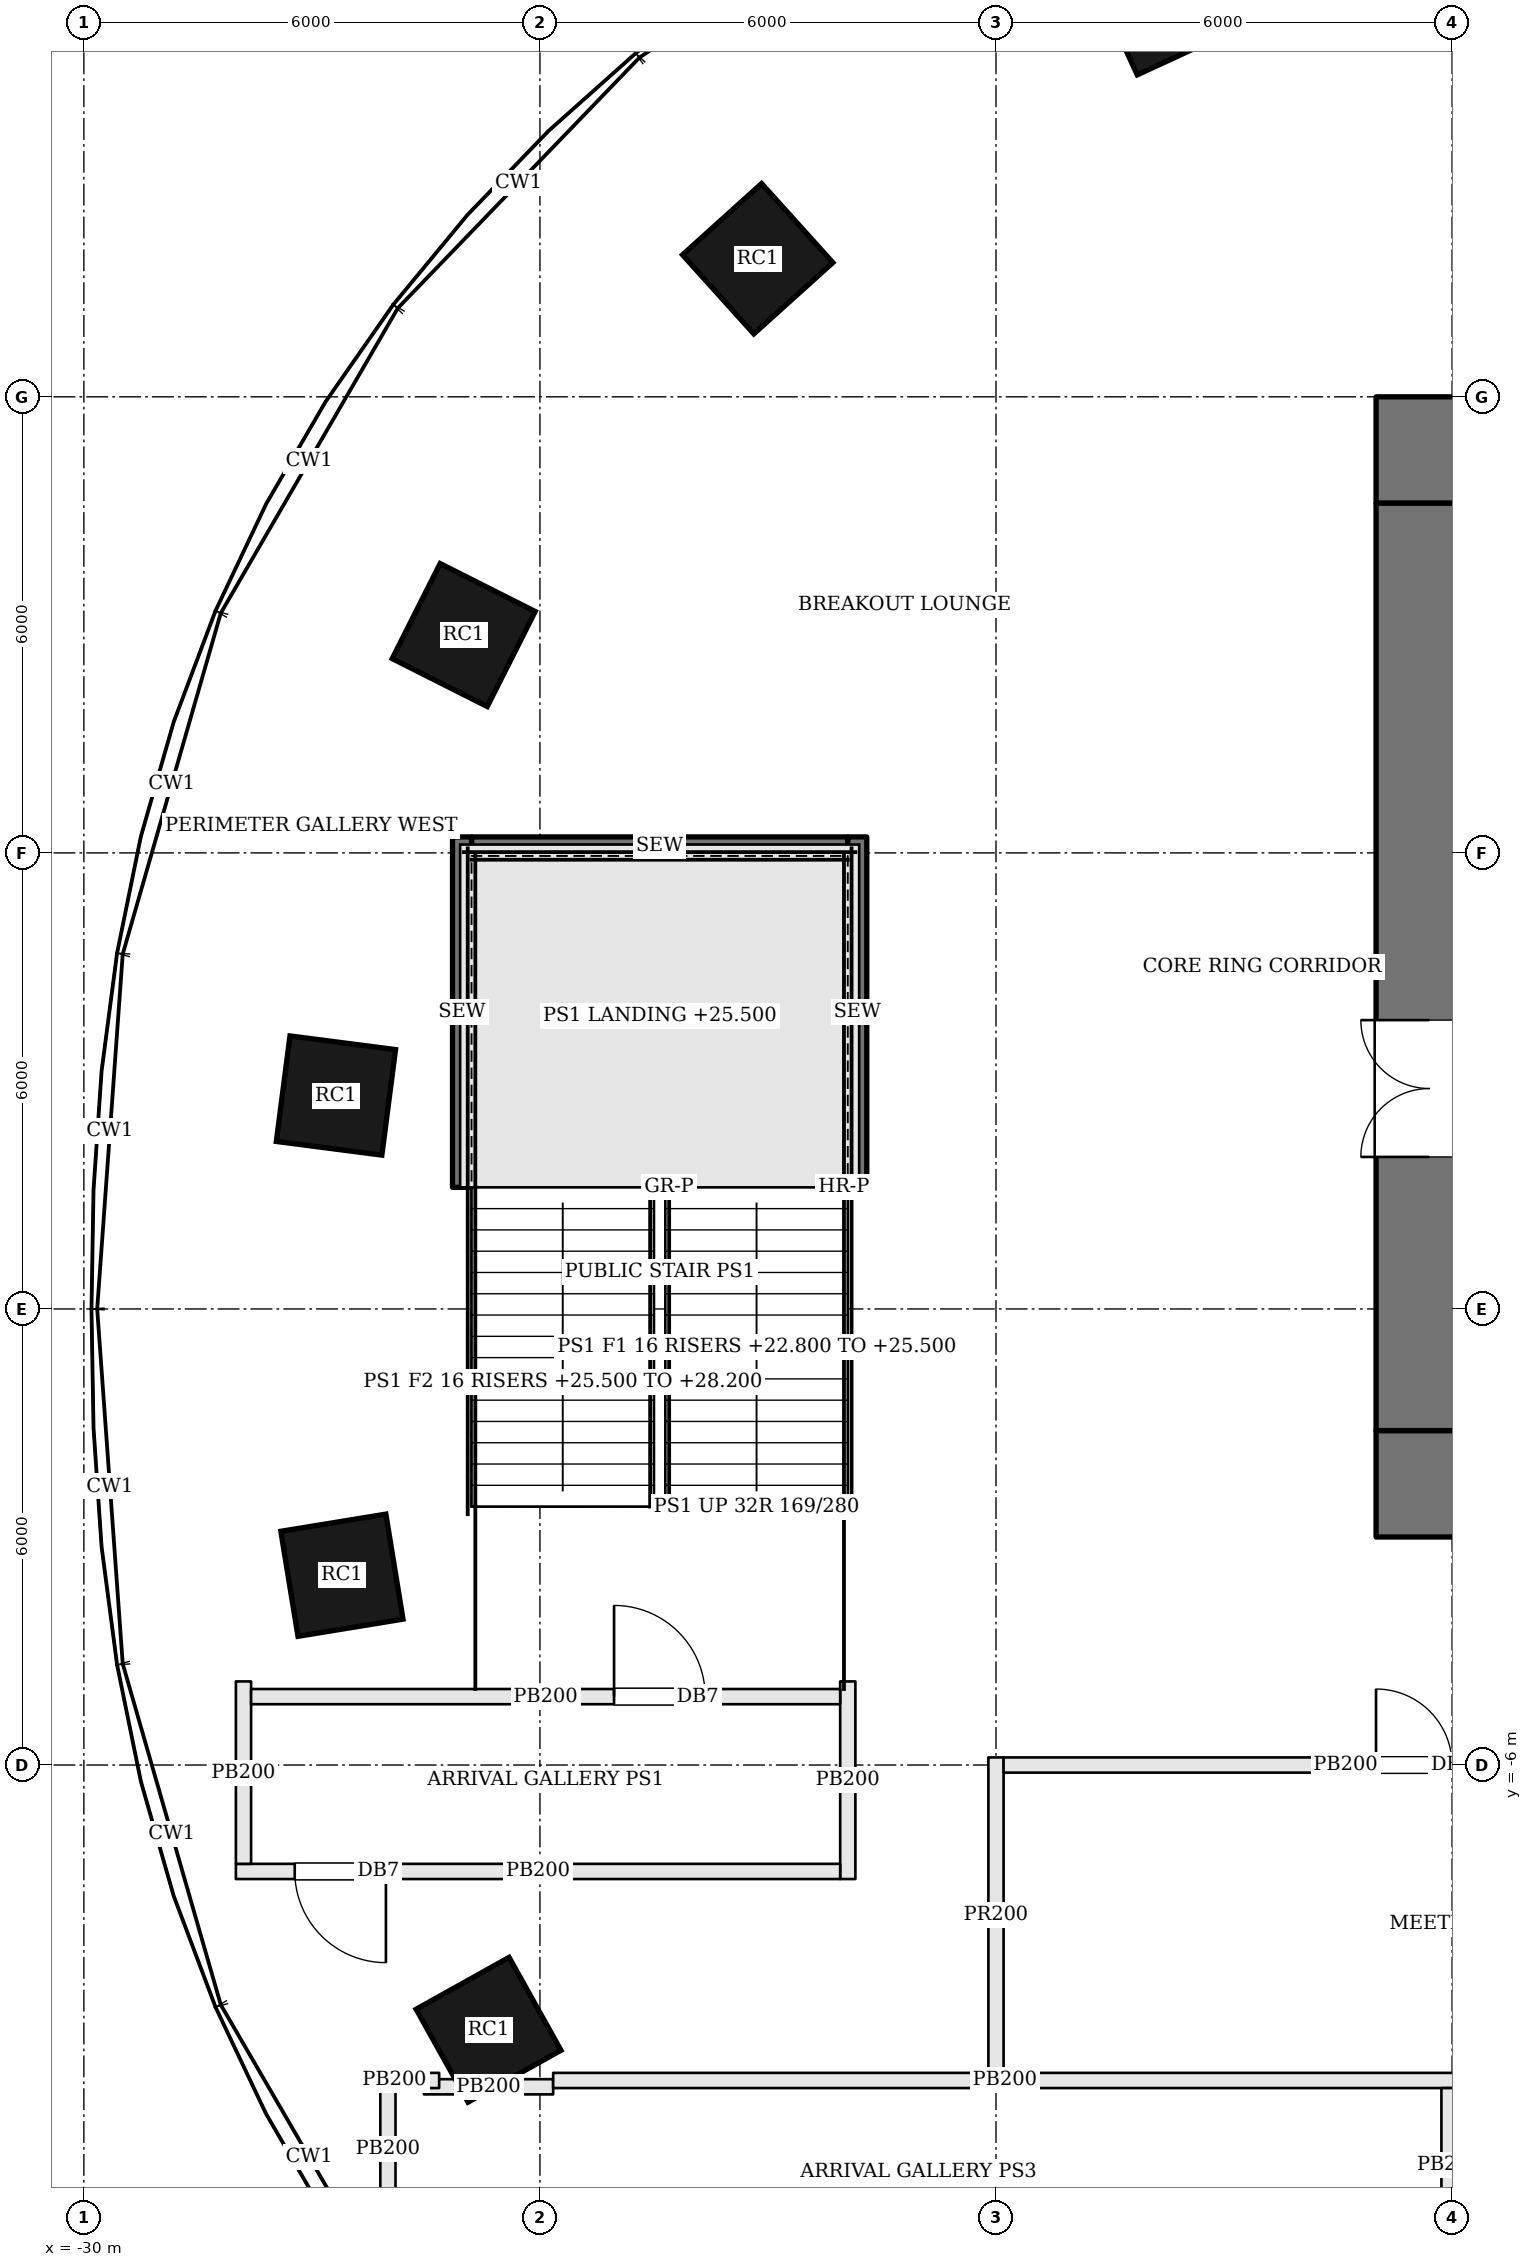
"""IFC4 building model, lengths in metres.
Left out: names, types, materials, properties, quantities, classifications, styles, units other than length and angle.
Written with IfcOpenShell. Run it as: python <this file> out.ifc"""

import sys

from ifc_helpers import new_model, si_unit, direction, frame, frame_2d, origin, origin_2d, place, context, subcontext, project, spatial, rectangle, extrude, element, fill, save


model = new_model("IFC4")
c1 = context("Model", 3, precision=1e-05, world=origin(), true_north=direction((0.0, 1.0)))
c2 = subcontext(c1, "Body", "Model", "MODEL_VIEW")
j1 = project(units=[si_unit("LENGTHUNIT", "METRE"), si_unit("PLANEANGLEUNIT", "RADIAN")], contexts=[c1])
p1 = place(None, origin())
s1 = spatial("IfcSite", under=j1, at=p1, CompositionType="ELEMENT")
p2 = place(p1, origin())
s2 = spatial("IfcBuilding", under=s1, at=p2, CompositionType="ELEMENT")
p3 = place(p2, frame((0.0, 0.0, 22.8)))
s3 = spatial("IfcBuildingStorey", under=s2, at=p3, CompositionType="ELEMENT", Elevation=22.8)
p4 = place(p3, frame((-13.0, 11.3, 0.0), z_axis=(0.0, 0.0, 1.0), x_axis=(1.0, 0.0, 0.0)))
e1 = element("IfcWall", 1, at=p4, inside=s3, PredefinedType="SHEAR", context=c2, shape_type="SweptSolid", body=[
    extrude(rectangle(XDim=26.0, YDim=1.4, at=frame_2d((13.0, 0.0))), origin(), (0.0, 0.0, 1.0), 5.4),
])
p5 = place(p4, frame((8.575, 0.0, 0.0)))
e2 = element("IfcOpeningElement", 2, at=p5, cuts=e1, PredefinedType="OPENING", context=c2, shape_type="SweptSolid", body=[
    extrude(rectangle(XDim=0.7, YDim=2.1, at=frame_2d((0.35, 1.05))), frame((0.0, 0.71, 0.0), z_axis=(0.0, -1.0, 0.0), x_axis=(1.0, 0.0, 0.0)), (0.0, 0.0, 1.0), 1.42),
])
p6 = place(p4, frame((10.875, 0.0, 0.0)))
e3 = element("IfcOpeningElement", 3, at=p6, cuts=e1, PredefinedType="OPENING", context=c2, shape_type="SweptSolid", body=[
    extrude(rectangle(XDim=1.0, YDim=2.1, at=frame_2d((0.5, 1.05))), frame((0.0, 0.71, 0.0), z_axis=(0.0, -1.0, 0.0), x_axis=(1.0, 0.0, 0.0)), (0.0, 0.0, 1.0), 1.42),
])
p7 = place(p4, frame((13.875, 0.0, 0.0)))
e4 = element("IfcOpeningElement", 4, at=p7, cuts=e1, PredefinedType="OPENING", context=c2, shape_type="SweptSolid", body=[
    extrude(rectangle(XDim=0.7, YDim=2.1, at=frame_2d((0.35, 1.05))), frame((0.0, 0.71, 0.0), z_axis=(0.0, -1.0, 0.0), x_axis=(1.0, 0.0, 0.0)), (0.0, 0.0, 1.0), 1.42),
])
p8 = place(p4, frame((16.175, 0.0, 0.0)))
e5 = element("IfcOpeningElement", 5, at=p8, cuts=e1, PredefinedType="OPENING", context=c2, shape_type="SweptSolid", body=[
    extrude(rectangle(XDim=1.0, YDim=2.1, at=frame_2d((0.5, 1.05))), frame((0.0, 0.71, 0.0), z_axis=(0.0, -1.0, 0.0), x_axis=(1.0, 0.0, 0.0)), (0.0, 0.0, 1.0), 1.42),
])
p9 = place(p3, frame((-13.0, -2.3, 0.0), z_axis=(0.0, 0.0, 1.0), x_axis=(1.0, 0.0, 0.0)))
e6 = element("IfcWall", 6, at=p9, inside=s3, PredefinedType="SHEAR", context=c2, shape_type="SweptSolid", body=[
    extrude(rectangle(XDim=26.0, YDim=1.4, at=frame_2d((13.0, 0.0))), origin(), (0.0, 0.0, 1.0), 5.4),
])
p10 = place(p9, frame((9.3, 0.0, 0.0)))
e7 = element("IfcOpeningElement", 7, at=p10, cuts=e6, PredefinedType="OPENING", context=c2, shape_type="SweptSolid", body=[
    extrude(rectangle(XDim=0.9, YDim=2.1, at=frame_2d((0.45, 1.05))), frame((0.0, 0.71, 0.0), z_axis=(0.0, -1.0, 0.0), x_axis=(1.0, 0.0, 0.0)), (0.0, 0.0, 1.0), 1.42),
])
p11 = place(p9, frame((12.5, 0.0, 0.0)))
e8 = element("IfcOpeningElement", 8, at=p11, cuts=e6, PredefinedType="OPENING", context=c2, shape_type="SweptSolid", body=[
    extrude(rectangle(XDim=0.9, YDim=2.1, at=frame_2d((0.45, 1.05))), frame((0.0, 0.71, 0.0), z_axis=(0.0, -1.0, 0.0), x_axis=(1.0, 0.0, 0.0)), (0.0, 0.0, 1.0), 1.42),
])
p12 = place(p9, frame((14.9, 0.0, 0.0)))
e9 = element("IfcOpeningElement", 9, at=p12, cuts=e6, PredefinedType="OPENING", context=c2, shape_type="SweptSolid", body=[
    extrude(rectangle(XDim=1.0, YDim=2.1, at=frame_2d((0.5, 1.05))), frame((0.0, 0.71, 0.0), z_axis=(0.0, -1.0, 0.0), x_axis=(1.0, 0.0, 0.0)), (0.0, 0.0, 1.0), 1.42),
])
p13 = place(p9, frame((16.6, 0.0, 0.0)))
e10 = element("IfcOpeningElement", 10, at=p13, cuts=e6, PredefinedType="OPENING", context=c2, shape_type="SweptSolid", body=[
    extrude(rectangle(XDim=1.0, YDim=2.1, at=frame_2d((0.5, 1.05))), frame((0.0, 0.71, 0.0), z_axis=(0.0, -1.0, 0.0), x_axis=(1.0, 0.0, 0.0)), (0.0, 0.0, 1.0), 1.42),
])
p14 = place(p3, frame((-12.3, -1.6, 0.0), z_axis=(0.0, 0.0, 1.0), x_axis=(0.0, 1.0, 0.0)))
e11 = element("IfcWall", 11, at=p14, inside=s3, PredefinedType="SHEAR", context=c2, shape_type="SweptSolid", body=[
    extrude(rectangle(XDim=12.2, YDim=1.4, at=frame_2d((6.1, 0.0))), origin(), (0.0, 0.0, 1.0), 5.4),
])
p15 = place(p14, frame((3.6, 0.0, 0.0)))
e12 = element("IfcOpeningElement", 12, at=p15, cuts=e11, PredefinedType="OPENING", context=c2, shape_type="SweptSolid", body=[
    extrude(rectangle(XDim=1.8, YDim=2.1, at=frame_2d((0.9, 1.05))), frame((0.0, 0.71, 0.0), z_axis=(0.0, -1.0, 0.0), x_axis=(1.0, 0.0, 0.0)), (0.0, 0.0, 1.0), 1.42),
])
for number, where, z_axis, x_axis in (
    (13, (-15.799, 17.165, 0.0), (0.0, 0.0, 1.0), (-0.908, -0.419, 0.0)),
    (14, (-21.135, 13.817, 0.0), (0.0, 0.0, 1.0), (-0.743, -0.67, 0.0)),
    (15, (-25.003, 8.866, 0.0), (0.0, 0.0, 1.0), (-0.45, -0.893, 0.0)),
    (16, (-26.684, 2.808, 0.0), (0.0, 0.0, 1.0), (-0.128, -0.992, 0.0)),
    (17, (-26.605, -3.503, 0.0), (0.0, 0.0, 1.0), (0.161, -0.987, 0.0)),
    (18, (-24.676, -9.483, 0.0), (0.0, 0.0, 1.0), (0.487, -0.873, 0.0)),
):
    element("IfcColumn", number, at=place(p3, frame(where, z_axis=z_axis, x_axis=x_axis)), inside=s3, PredefinedType="COLUMN", context=c2, shape_type="SweptSolid", body=[
        extrude(rectangle(XDim=1.4, YDim=1.4, at=origin_2d()), origin(), (0.0, 0.0, 1.0), 5.4),
    ])
p16 = place(p3, frame((-19.95, -4.9, 0.0), z_axis=(0.0, 0.0, 1.0), x_axis=(0.0, -1.0, 0.0)))
e19 = element("IfcWall", 19, at=p16, inside=s3, PredefinedType="PARTITIONING", context=c2, shape_type="SweptSolid", body=[
    extrude(rectangle(XDim=2.6, YDim=0.2, at=frame_2d((1.3, 0.0))), origin(), (0.0, 0.0, 1.0), 4.43),
])
p17 = place(p3, frame((-20.05, -7.4, 0.0), z_axis=(0.0, 0.0, 1.0), x_axis=(-1.0, 0.0, 0.0)))
e20 = element("IfcWall", 20, at=p17, inside=s3, PredefinedType="PARTITIONING", context=c2, shape_type="SweptSolid", body=[
    extrude(rectangle(XDim=7.95, YDim=0.2, at=frame_2d((3.975, 0.0))), origin(), (0.0, 0.0, 1.0), 4.43),
])
p18 = place(p17, frame((5.976, 0.0, 0.0)))
e21 = element("IfcOpeningElement", 21, at=p18, cuts=e20, PredefinedType="OPENING", context=c2, shape_type="SweptSolid", body=[
    extrude(rectangle(XDim=1.2, YDim=2.1, at=frame_2d((0.6, 1.05))), frame((0.0, 0.11, 0.0), z_axis=(0.0, -1.0, 0.0), x_axis=(1.0, 0.0, 0.0)), (0.0, 0.0, 1.0), 0.22),
])
p19 = place(p3, frame((-27.9, -7.3, 0.0), z_axis=(0.0, 0.0, 1.0), x_axis=(0.0, 1.0, 0.0)))
e22 = element("IfcWall", 22, at=p19, inside=s3, PredefinedType="PARTITIONING", context=c2, shape_type="SweptSolid", body=[
    extrude(rectangle(XDim=2.4, YDim=0.2, at=frame_2d((1.2, 0.0))), origin(), (0.0, 0.0, 1.0), 4.43),
])
p20 = place(p3, frame((-27.8, -5.1, 0.0), z_axis=(0.0, 0.0, 1.0), x_axis=(1.0, 0.0, 0.0)))
e23 = element("IfcWall", 23, at=p20, inside=s3, PredefinedType="PARTITIONING", context=c2, shape_type="SweptSolid", body=[
    extrude(rectangle(XDim=7.75, YDim=0.2, at=frame_2d((3.875, 0.0))), origin(), (0.0, 0.0, 1.0), 4.43),
])
p21 = place(p20, frame((4.775, 0.0, 0.0)))
e24 = element("IfcOpeningElement", 24, at=p21, cuts=e23, PredefinedType="OPENING", context=c2, shape_type="SweptSolid", body=[
    extrude(rectangle(XDim=1.2, YDim=2.1, at=frame_2d((0.6, 1.05))), frame((0.0, 0.11, 0.0), z_axis=(0.0, -1.0, 0.0), x_axis=(1.0, 0.0, 0.0)), (0.0, 0.0, 1.0), 0.22),
])
p22 = place(p3, frame((-25.526, -10.233, 0.0), z_axis=(0.0, 0.0, 1.0), x_axis=(1.0, 0.0, 0.0)))
e25 = element("IfcWall", 25, at=p22, inside=s3, PredefinedType="PARTITIONING", context=c2, shape_type="SweptSolid", body=[
    extrude(rectangle(XDim=1.7, YDim=0.2, at=frame_2d((0.85, 0.0))), origin(), (0.0, 0.0, 1.0), 4.43),
])
p23 = place(p3, frame((-23.826, -10.15, 0.0), z_axis=(0.0, 0.0, 1.0), x_axis=(1.0, 0.0, 0.0)))
e26 = element("IfcWall", 26, at=p23, inside=s3, PredefinedType="PARTITIONING", context=c2, shape_type="SweptSolid", body=[
    extrude(rectangle(XDim=11.886, YDim=0.2, at=frame_2d((5.943, 0.0))), origin(), (0.0, 0.0, 1.0), 4.43),
])
p24 = place(p3, frame((-12.04, -10.25, 0.0), z_axis=(0.0, 0.0, 1.0), x_axis=(0.0, -1.0, 0.0)))
e27 = element("IfcWall", 27, at=p24, inside=s3, PredefinedType="PARTITIONING", context=c2, shape_type="SweptSolid", body=[
    extrude(rectangle(XDim=2.03, YDim=0.2, at=frame_2d((1.015, 0.0))), origin(), (0.0, 0.0, 1.0), 4.43),
])
p25 = place(p3, frame((-26.0, -12.063, 0.0), z_axis=(0.0, 0.0, 1.0), x_axis=(0.0, 1.0, 0.0)))
e28 = element("IfcWall", 28, at=p25, inside=s3, PredefinedType="PARTITIONING", context=c2, shape_type="SweptSolid", body=[
    extrude(rectangle(XDim=2.013, YDim=0.2, at=frame_2d((1.006, 0.0))), origin(), (0.0, 0.0, 1.0), 4.43),
])
p26 = place(p3, frame((-25.9, -10.15, 0.0), z_axis=(0.0, 0.0, 1.0), x_axis=(1.0, 0.0, 0.0)))
e29 = element("IfcWall", 29, at=p26, inside=s3, PredefinedType="PARTITIONING", context=c2, shape_type="SweptSolid", body=[
    extrude(rectangle(XDim=0.574, YDim=0.2, at=frame_2d((0.287, 0.0))), origin(), (0.0, 0.0, 1.0), 4.43),
])
p27 = place(p3, frame((-18.0, -10.05, 0.0), z_axis=(0.0, 0.0, 1.0), x_axis=(0.0, 1.0, 0.0)))
e30 = element("IfcWall", 30, at=p27, inside=s3, PredefinedType="PARTITIONING", context=c2, shape_type="SweptSolid", body=[
    extrude(rectangle(XDim=4.15, YDim=0.2, at=frame_2d((2.075, 0.0))), origin(), (0.0, 0.0, 1.0), 4.43),
])
p28 = place(p3, frame((-17.9, -6.0, 0.0), z_axis=(0.0, 0.0, 1.0), x_axis=(1.0, 0.0, 0.0)))
e31 = element("IfcWall", 31, at=p28, inside=s3, PredefinedType="PARTITIONING", context=c2, shape_type="SweptSolid", body=[
    extrude(rectangle(XDim=9.0, YDim=0.2, at=frame_2d((4.5, 0.0))), origin(), (0.0, 0.0, 1.0), 4.43),
])
p29 = place(p28, frame((4.9, 0.0, 0.0)))
e32 = element("IfcOpeningElement", 32, at=p29, cuts=e31, PredefinedType="OPENING", context=c2, shape_type="SweptSolid", body=[
    extrude(rectangle(XDim=1.0, YDim=2.1, at=frame_2d((0.5, 1.05))), frame((0.0, 0.11, 0.0), z_axis=(0.0, -1.0, 0.0), x_axis=(1.0, 0.0, 0.0)), (0.0, 0.0, 1.0), 0.22),
])
p30 = place(p3, frame((-19.95, 6.085, 0.0), z_axis=(0.0, 0.0, 1.0), x_axis=(-1.0, 0.0, 0.0)))
e33 = element("IfcWall", 33, at=p30, inside=s3, PredefinedType="SOLIDWALL", context=c2, shape_type="SweptSolid", body=[
    extrude(rectangle(XDim=4.95, YDim=0.25, at=frame_2d((2.475, 0.0))), origin(), (0.0, 0.0, 1.0), 5.15),
])
for number, where, z_axis, x_axis in (
    (34, (-25.025, 1.6, 0.0), (0.0, 0.0, 1.0), (0.0, 1.0, 0.0)),
    (35, (-19.825, 1.6, 0.0), (0.0, 0.0, 1.0), (0.0, 1.0, 0.0)),
):
    element("IfcWall", number, at=place(p3, frame(where, z_axis=z_axis, x_axis=x_axis)), inside=s3, PredefinedType="SOLIDWALL", context=c2, shape_type="SweptSolid", body=[
        extrude(rectangle(XDim=4.61, YDim=0.25, at=frame_2d((2.305, 0.0))), origin(), (0.0, 0.0, 1.0), 5.15),
    ])
p31 = place(p15, origin())
e36 = element("IfcDoor", 36, at=p31, inside=s3, OperationType="DOUBLE_DOOR_SINGLE_SWING", PredefinedType="DOOR", context=c2, shape_type="SweptSolid", body=[
    extrude(rectangle(XDim=1.8, YDim=2.1, at=frame_2d((0.9, 1.05))), frame((0.0, 0.025, 0.0), z_axis=(0.0, -1.0, 0.0), x_axis=(1.0, 0.0, 0.0)), (0.0, 0.0, 1.0), 0.05),
])
fill(e12, e36)
p32 = place(p21, origin())
e37 = element("IfcDoor", 37, at=p32, inside=s3, OperationType="SINGLE_SWING_LEFT", PredefinedType="DOOR", context=c2, shape_type="SweptSolid", body=[
    extrude(rectangle(XDim=1.2, YDim=2.1, at=frame_2d((0.6, 1.05))), frame((0.0, 0.025, 0.0), z_axis=(0.0, -1.0, 0.0), x_axis=(1.0, 0.0, 0.0)), (0.0, 0.0, 1.0), 0.05),
])
fill(e24, e37)
p33 = place(p18, origin())
e38 = element("IfcDoor", 38, at=p33, inside=s3, OperationType="SINGLE_SWING_LEFT", PredefinedType="DOOR", context=c2, shape_type="SweptSolid", body=[
    extrude(rectangle(XDim=1.2, YDim=2.1, at=frame_2d((0.6, 1.05))), frame((0.0, 0.025, 0.0), z_axis=(0.0, -1.0, 0.0), x_axis=(1.0, 0.0, 0.0)), (0.0, 0.0, 1.0), 0.05),
])
fill(e21, e38)
p34 = place(p29, origin())
e39 = element("IfcDoor", 39, at=p34, inside=s3, OperationType="SINGLE_SWING_LEFT", PredefinedType="DOOR", context=c2, shape_type="SweptSolid", body=[
    extrude(rectangle(XDim=1.0, YDim=2.1, at=frame_2d((0.5, 1.05))), frame((0.0, 0.025, 0.0), z_axis=(0.0, -1.0, 0.0), x_axis=(1.0, 0.0, 0.0)), (0.0, 0.0, 1.0), 0.05),
])
fill(e32, e39)
save(model, sys.argv[1])
